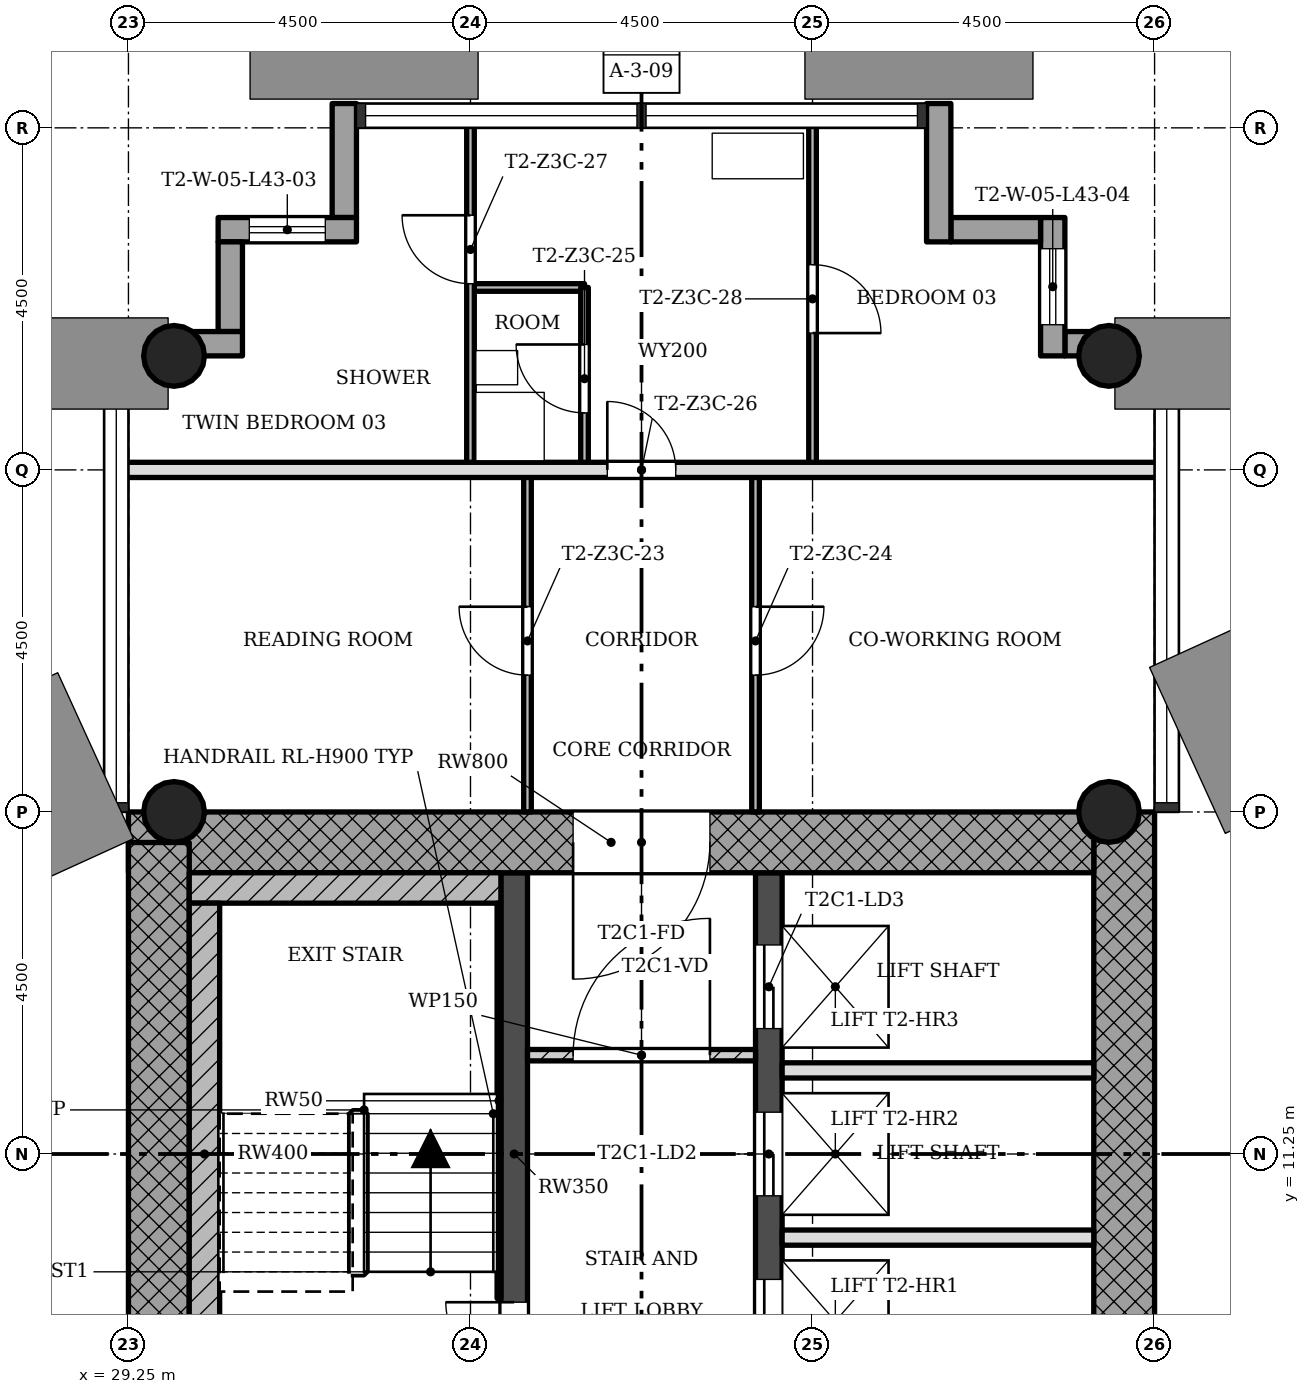
"""IFC4 building model, lengths in metres.
Left out: names, types, materials, properties, quantities, classifications, styles, units other than length and angle.
Written with IfcOpenShell. Run it as: python <this file> out.ifc"""

import sys

from ifc_helpers import new_model, si_unit, direction, frame, frame_2d, origin, origin_2d, place, context, subcontext, project, spatial, rectangle, hollow_circle, extrude, element, fill, save


model = new_model("IFC4")
c1 = context("Model", 3, precision=1e-05, world=origin(), true_north=direction((0.0, 1.0)))
c2 = subcontext(c1, "Body", "Model", "MODEL_VIEW")
j1 = project(units=[si_unit("LENGTHUNIT", "METRE"), si_unit("PLANEANGLEUNIT", "RADIAN")], contexts=[c1])
p1 = place(None, origin())
s1 = spatial("IfcSite", under=j1, at=p1, CompositionType="ELEMENT")
p2 = place(p1, origin())
s2 = spatial("IfcBuilding", under=s1, at=p2, CompositionType="ELEMENT")
p3 = place(p2, frame((0.0, 0.0, 157.5)))
s3 = spatial("IfcBuildingStorey", under=s2, at=p3, CompositionType="ELEMENT", Elevation=157.5)
p4 = place(p3, frame((42.35, 7.55, 0.0), z_axis=(0.0, 0.0, 1.0), x_axis=(0.0, 1.0, 0.0)))
e1 = element("IfcWall", 1, at=p4, inside=s3, PredefinedType="SHEAR", context=c2, shape_type="SweptSolid", body=[
    extrude(rectangle(XDim=8.2, YDim=0.8, at=frame_2d((4.1, 0.0))), origin(), (0.0, 0.0, 1.0), 3.4),
])
p5 = place(p3, frame((41.95, 15.35, 0.0), z_axis=(0.0, 0.0, 1.0), x_axis=(-1.0, 0.0, 0.0)))
e2 = element("IfcWall", 2, at=p5, inside=s3, PredefinedType="SHEAR", context=c2, shape_type="SweptSolid", body=[
    extrude(rectangle(XDim=12.7, YDim=0.8, at=frame_2d((6.35, 0.0))), origin(), (0.0, 0.0, 1.0), 3.4),
])
p6 = place(p5, frame((5.05, 0.0, 0.0)))
e3 = element("IfcOpeningElement", 3, at=p6, cuts=e2, PredefinedType="OPENING", context=c2, shape_type="SweptSolid", body=[
    extrude(rectangle(XDim=1.8, YDim=2.1, at=frame_2d((0.9, 1.05))), frame((0.0, 0.41, 0.0), z_axis=(0.0, -1.0, 0.0), x_axis=(1.0, 0.0, 0.0)), (0.0, 0.0, 1.0), 0.82),
])
p7 = place(p3, frame((29.65, 15.348, 0.0), z_axis=(0.0, 0.0, 1.0), x_axis=(0.0, -1.0, 0.0)))
e4 = element("IfcWall", 4, at=p7, inside=s3, PredefinedType="SHEAR", context=c2, shape_type="SweptSolid", body=[
    extrude(rectangle(XDim=8.796, YDim=0.8, at=frame_2d((4.398, 0.0))), origin(), (0.0, 0.0, 1.0), 3.4),
])
p8 = place(p3, frame((34.325, 7.55, 0.0), z_axis=(0.0, 0.0, 1.0), x_axis=(0.0, 1.0, 0.0)))
e5 = element("IfcWall", 5, at=p8, inside=s3, PredefinedType="SHEAR", context=c2, shape_type="SweptSolid", body=[
    extrude(rectangle(XDim=7.4, YDim=0.35, at=frame_2d((3.7, 0.0))), origin(), (0.0, 0.0, 1.0), 3.4),
])
p9 = place(p8, frame((0.85, 0.0, 0.0)))
e6 = element("IfcOpeningElement", 6, at=p9, cuts=e5, PredefinedType="OPENING", context=c2, shape_type="SweptSolid", body=[
    extrude(rectangle(XDim=0.9, YDim=2.1, at=frame_2d((0.45, 1.05))), frame((0.0, 0.185, 0.0), z_axis=(0.0, -1.0, 0.0), x_axis=(1.0, 0.0, 0.0)), (0.0, 0.0, 1.0), 0.37),
])
p10 = place(p3, frame((37.675, 7.55, 0.0), z_axis=(0.0, 0.0, 1.0), x_axis=(0.0, 1.0, 0.0)))
e7 = element("IfcWall", 7, at=p10, inside=s3, PredefinedType="SHEAR", context=c2, shape_type="SweptSolid", body=[
    extrude(rectangle(XDim=7.4, YDim=0.35, at=frame_2d((3.7, 0.0))), origin(), (0.0, 0.0, 1.0), 3.4),
])
p11 = place(p10, frame((0.95, 0.0, 0.0)))
e8 = element("IfcOpeningElement", 8, at=p11, cuts=e7, PredefinedType="OPENING", context=c2, shape_type="SweptSolid", body=[
    extrude(rectangle(XDim=1.1, YDim=2.1, at=frame_2d((0.55, 1.05))), frame((0.0, 0.185, 0.0), z_axis=(0.0, -1.0, 0.0), x_axis=(1.0, 0.0, 0.0)), (0.0, 0.0, 1.0), 0.37),
])
p12 = place(p10, frame((3.15, 0.0, 0.0)))
e9 = element("IfcOpeningElement", 9, at=p12, cuts=e7, PredefinedType="OPENING", context=c2, shape_type="SweptSolid", body=[
    extrude(rectangle(XDim=1.1, YDim=2.1, at=frame_2d((0.55, 1.05))), frame((0.0, 0.185, 0.0), z_axis=(0.0, -1.0, 0.0), x_axis=(1.0, 0.0, 0.0)), (0.0, 0.0, 1.0), 0.37),
])
p13 = place(p10, frame((5.35, 0.0, 0.0)))
e10 = element("IfcOpeningElement", 10, at=p13, cuts=e7, PredefinedType="OPENING", context=c2, shape_type="SweptSolid", body=[
    extrude(rectangle(XDim=1.1, YDim=2.1, at=frame_2d((0.55, 1.05))), frame((0.0, 0.185, 0.0), z_axis=(0.0, -1.0, 0.0), x_axis=(1.0, 0.0, 0.0)), (0.0, 0.0, 1.0), 0.37),
])
for number, where, z_axis, x_axis in (
    (11, (42.15, 15.75, 0.0), (0.0, 0.0, 1.0), (1.0, 0.0, 0.0)),
    (12, (29.85, 15.75, 0.0), (0.0, 0.0, 1.0), (1.0, 0.0, 0.0)),
    (13, (42.15, 21.75, 0.0), (0.0, 0.0, 1.0), (1.0, 0.0, 0.0)),
    (14, (29.85, 21.75, 0.0), (0.0, 0.0, 1.0), (1.0, 0.0, 0.0)),
):
    element("IfcColumn", number, at=place(p3, frame(where, z_axis=z_axis, x_axis=x_axis)), inside=s3, PredefinedType="COLUMN", context=c2, shape_type="SweptSolid", body=[
        extrude(hollow_circle(Radius=0.4, WallThickness=0.028, at=origin_2d()), origin(), (0.0, 0.0, 1.0), 3.4),
    ])
p14 = place(p3, frame((43.07, 21.91, -0.3), z_axis=(0.0, 0.0, 1.0), x_axis=(-1.0, 0.0, 0.0)))
e15 = element("IfcWall", 15, at=p14, inside=s3, PredefinedType="STANDARD", context=c2, shape_type="SweptSolid", body=[
    extrude(rectangle(XDim=1.5, YDim=0.32, at=frame_2d((0.75, 0.0))), origin(), (0.0, 0.0, 1.0), 3.4),
])
p15 = place(p3, frame((41.41, 21.75, -0.3), z_axis=(0.0, 0.0, 1.0), x_axis=(0.0, 1.0, 0.0)))
e16 = element("IfcWall", 16, at=p15, inside=s3, PredefinedType="STANDARD", context=c2, shape_type="SweptSolid", body=[
    extrude(rectangle(XDim=1.82, YDim=0.32, at=frame_2d((0.91, 0.0))), origin(), (0.0, 0.0, 1.0), 3.4),
])
p16 = place(p15, frame((0.41, 0.0, 1.2)))
e17 = element("IfcOpeningElement", 17, at=p16, cuts=e16, PredefinedType="OPENING", context=c2, shape_type="SweptSolid", body=[
    extrude(rectangle(XDim=1.0, YDim=1.5, at=frame_2d((0.5, 0.75))), frame((0.0, 0.17, 0.0), z_axis=(0.0, -1.0, 0.0), x_axis=(1.0, 0.0, 0.0)), (0.0, 0.0, 1.0), 0.34),
])
p17 = place(p3, frame((41.25, 23.41, -0.3), z_axis=(0.0, 0.0, 1.0), x_axis=(-1.0, 0.0, 0.0)))
e18 = element("IfcWall", 18, at=p17, inside=s3, PredefinedType="STANDARD", context=c2, shape_type="SweptSolid", body=[
    extrude(rectangle(XDim=1.18, YDim=0.32, at=frame_2d((0.59, 0.0))), origin(), (0.0, 0.0, 1.0), 3.4),
])
p18 = place(p3, frame((39.91, 23.25, -0.3), z_axis=(0.0, 0.0, 1.0), x_axis=(0.0, 1.0, 0.0)))
e19 = element("IfcWall", 19, at=p18, inside=s3, PredefinedType="STANDARD", context=c2, shape_type="SweptSolid", body=[
    extrude(rectangle(XDim=1.82, YDim=0.32, at=frame_2d((0.91, 0.0))), origin(), (0.0, 0.0, 1.0), 3.4),
])
p19 = place(p3, frame((32.09, 25.07, -0.3), z_axis=(0.0, 0.0, 1.0), x_axis=(0.0, -1.0, 0.0)))
e20 = element("IfcWall", 20, at=p19, inside=s3, PredefinedType="STANDARD", context=c2, shape_type="SweptSolid", body=[
    extrude(rectangle(XDim=1.5, YDim=0.32, at=frame_2d((0.75, 0.0))), origin(), (0.0, 0.0, 1.0), 3.4),
])
p20 = place(p3, frame((32.25, 23.41, -0.3), z_axis=(0.0, 0.0, 1.0), x_axis=(-1.0, 0.0, 0.0)))
e21 = element("IfcWall", 21, at=p20, inside=s3, PredefinedType="STANDARD", context=c2, shape_type="SweptSolid", body=[
    extrude(rectangle(XDim=1.82, YDim=0.32, at=frame_2d((0.91, 0.0))), origin(), (0.0, 0.0, 1.0), 3.4),
])
p21 = place(p20, frame((0.41, 0.0, 1.2)))
e22 = element("IfcOpeningElement", 22, at=p21, cuts=e21, PredefinedType="OPENING", context=c2, shape_type="SweptSolid", body=[
    extrude(rectangle(XDim=1.0, YDim=1.5, at=frame_2d((0.5, 0.75))), frame((0.0, 0.17, 0.0), z_axis=(0.0, -1.0, 0.0), x_axis=(1.0, 0.0, 0.0)), (0.0, 0.0, 1.0), 0.34),
])
p22 = place(p3, frame((30.59, 23.25, -0.3), z_axis=(0.0, 0.0, 1.0), x_axis=(0.0, -1.0, 0.0)))
e23 = element("IfcWall", 23, at=p22, inside=s3, PredefinedType="STANDARD", context=c2, shape_type="SweptSolid", body=[
    extrude(rectangle(XDim=1.18, YDim=0.32, at=frame_2d((0.59, 0.0))), origin(), (0.0, 0.0, 1.0), 3.4),
])
p23 = place(p3, frame((30.75, 21.91, -0.3), z_axis=(0.0, 0.0, 1.0), x_axis=(-1.0, 0.0, 0.0)))
e24 = element("IfcWall", 24, at=p23, inside=s3, PredefinedType="STANDARD", context=c2, shape_type="SweptSolid", body=[
    extrude(rectangle(XDim=1.82, YDim=0.32, at=frame_2d((0.91, 0.0))), origin(), (0.0, 0.0, 1.0), 3.4),
])
p24 = place(p3, frame((37.5, 12.55, 0.0), z_axis=(0.0, 0.0, 1.0), x_axis=(-1.0, 0.0, 0.0)))
e25 = element("IfcWall", 25, at=p24, inside=s3, PredefinedType="PARTITIONING", context=c2, shape_type="SweptSolid", body=[
    extrude(rectangle(XDim=3.0, YDim=0.15, at=frame_2d((1.5, 0.0))), origin(), (0.0, 0.0, 1.0), 3.0),
])
p25 = place(p24, frame((0.6, 0.0, 0.0)))
e26 = element("IfcOpeningElement", 26, at=p25, cuts=e25, PredefinedType="OPENING", context=c2, shape_type="SweptSolid", body=[
    extrude(rectangle(XDim=1.8, YDim=2.1, at=frame_2d((0.9, 1.05))), frame((0.0, 0.085, 0.0), z_axis=(0.0, -1.0, 0.0), x_axis=(1.0, 0.0, 0.0)), (0.0, 0.0, 1.0), 0.17),
])
for number, where, z_axis, x_axis in (
    (27, (41.95, 10.15, 0.0), (0.0, 0.0, 1.0), (-1.0, 0.0, 0.0)),
    (28, (41.95, 12.35, 0.0), (0.0, 0.0, 1.0), (-1.0, 0.0, 0.0)),
):
    element("IfcWall", number, at=place(p3, frame(where, z_axis=z_axis, x_axis=x_axis)), inside=s3, PredefinedType="SOLIDWALL", context=c2, shape_type="SweptSolid", body=[
        extrude(rectangle(XDim=4.1, YDim=0.2, at=frame_2d((2.05, 0.0))), origin(), (0.0, 0.0, 1.0), 3.0),
    ])
p26 = place(p3, frame((42.85, 20.25, 0.0), z_axis=(0.0, 0.0, 1.0), x_axis=(-1.0, 0.0, 0.0)))
e29 = element("IfcWall", 29, at=p26, inside=s3, PredefinedType="SOLIDWALL", context=c2, shape_type="SweptSolid", body=[
    extrude(rectangle(XDim=13.7, YDim=0.2, at=frame_2d((6.85, 0.0))), origin(), (0.0, 0.0, 1.0), 3.0),
])
p27 = place(p26, frame((6.4, 0.0, 0.0)))
e30 = element("IfcOpeningElement", 30, at=p27, cuts=e29, PredefinedType="OPENING", context=c2, shape_type="SweptSolid", body=[
    extrude(rectangle(XDim=0.9, YDim=2.1, at=frame_2d((0.45, 1.05))), frame((0.0, 0.11, 0.0), z_axis=(0.0, -1.0, 0.0), x_axis=(1.0, 0.0, 0.0)), (0.0, 0.0, 1.0), 0.22),
])
p28 = place(p3, frame((35.25, 22.65, 0.0), z_axis=(0.0, 0.0, 1.0), x_axis=(-1.0, 0.0, 0.0)))
e31 = element("IfcWall", 31, at=p28, inside=s3, PredefinedType="PARTITIONING", context=c2, shape_type="SweptSolid", body=[
    extrude(rectangle(XDim=1.5, YDim=0.1, at=frame_2d((0.75, 0.0))), origin(), (0.0, 0.0, 1.0), 3.0),
])
p29 = place(p3, frame((38.25, 20.25, 0.0), z_axis=(0.0, 0.0, 1.0), x_axis=(0.0, 1.0, 0.0)))
e32 = element("IfcWall", 32, at=p29, inside=s3, PredefinedType="PARTITIONING", context=c2, shape_type="SweptSolid", body=[
    extrude(rectangle(XDim=4.6, YDim=0.1, at=frame_2d((2.3, 0.0))), origin(), (0.0, 0.0, 1.0), 3.0),
])
p30 = place(p29, frame((1.8, 0.0, 0.0)))
e33 = element("IfcOpeningElement", 33, at=p30, cuts=e32, PredefinedType="OPENING", context=c2, shape_type="SweptSolid", body=[
    extrude(rectangle(XDim=0.9, YDim=2.1, at=frame_2d((0.45, 1.05))), frame((0.0, 0.06, 0.0), z_axis=(0.0, -1.0, 0.0), x_axis=(1.0, 0.0, 0.0)), (0.0, 0.0, 1.0), 0.12),
])
p31 = place(p3, frame((37.5, 15.75, 0.0), z_axis=(0.0, 0.0, 1.0), x_axis=(0.0, 1.0, 0.0)))
e34 = element("IfcWall", 34, at=p31, inside=s3, PredefinedType="PARTITIONING", context=c2, shape_type="SweptSolid", body=[
    extrude(rectangle(XDim=4.5, YDim=0.1, at=frame_2d((2.25, 0.0))), origin(), (0.0, 0.0, 1.0), 3.0),
])
p32 = place(p31, frame((1.8, 0.0, 0.0)))
e35 = element("IfcOpeningElement", 35, at=p32, cuts=e34, PredefinedType="OPENING", context=c2, shape_type="SweptSolid", body=[
    extrude(rectangle(XDim=0.9, YDim=2.1, at=frame_2d((0.45, 1.05))), frame((0.0, 0.06, 0.0), z_axis=(0.0, -1.0, 0.0), x_axis=(1.0, 0.0, 0.0)), (0.0, 0.0, 1.0), 0.12),
])
p33 = place(p3, frame((35.25, 20.25, 0.0), z_axis=(0.0, 0.0, 1.0), x_axis=(0.0, 1.0, 0.0)))
e36 = element("IfcWall", 36, at=p33, inside=s3, PredefinedType="PARTITIONING", context=c2, shape_type="SweptSolid", body=[
    extrude(rectangle(XDim=2.4, YDim=0.1, at=frame_2d((1.2, 0.0))), origin(), (0.0, 0.0, 1.0), 3.0),
])
p34 = place(p33, frame((0.75, 0.0, 0.0)))
e37 = element("IfcOpeningElement", 37, at=p34, cuts=e36, PredefinedType="OPENING", context=c2, shape_type="SweptSolid", body=[
    extrude(rectangle(XDim=0.9, YDim=2.1, at=frame_2d((0.45, 1.05))), frame((0.0, 0.06, 0.0), z_axis=(0.0, -1.0, 0.0), x_axis=(1.0, 0.0, 0.0)), (0.0, 0.0, 1.0), 0.12),
])
p35 = place(p3, frame((34.5, 15.75, 0.0), z_axis=(0.0, 0.0, 1.0), x_axis=(0.0, 1.0, 0.0)))
e38 = element("IfcWall", 38, at=p35, inside=s3, PredefinedType="PARTITIONING", context=c2, shape_type="SweptSolid", body=[
    extrude(rectangle(XDim=4.5, YDim=0.1, at=frame_2d((2.25, 0.0))), origin(), (0.0, 0.0, 1.0), 3.0),
])
p36 = place(p35, frame((1.8, 0.0, 0.0)))
e39 = element("IfcOpeningElement", 39, at=p36, cuts=e38, PredefinedType="OPENING", context=c2, shape_type="SweptSolid", body=[
    extrude(rectangle(XDim=0.9, YDim=2.1, at=frame_2d((0.45, 1.05))), frame((0.0, 0.06, 0.0), z_axis=(0.0, -1.0, 0.0), x_axis=(1.0, 0.0, 0.0)), (0.0, 0.0, 1.0), 0.12),
])
p37 = place(p3, frame((33.75, 20.25, 0.0), z_axis=(0.0, 0.0, 1.0), x_axis=(0.0, 1.0, 0.0)))
e40 = element("IfcWall", 40, at=p37, inside=s3, PredefinedType="PARTITIONING", context=c2, shape_type="SweptSolid", body=[
    extrude(rectangle(XDim=4.6, YDim=0.1, at=frame_2d((2.3, 0.0))), origin(), (0.0, 0.0, 1.0), 3.0),
])
p38 = place(p37, frame((2.45, 0.0, 0.0)))
e41 = element("IfcOpeningElement", 41, at=p38, cuts=e40, PredefinedType="OPENING", context=c2, shape_type="SweptSolid", body=[
    extrude(rectangle(XDim=0.9, YDim=2.1, at=frame_2d((0.45, 1.05))), frame((0.0, 0.06, 0.0), z_axis=(0.0, -1.0, 0.0), x_axis=(1.0, 0.0, 0.0)), (0.0, 0.0, 1.0), 0.12),
])
p39 = place(p3, frame((34.15, 14.75, 0.0), z_axis=(0.0, 0.0, 1.0), x_axis=(-1.0, 0.0, 0.0)))
e42 = element("IfcWall", 42, at=p39, inside=s3, PredefinedType="SHEAR", context=c2, shape_type="SweptSolid", body=[
    extrude(rectangle(XDim=4.1, YDim=0.4, at=frame_2d((2.05, 0.0))), origin(), (0.0, 0.0, 1.0), 3.4),
])
p40 = place(p3, frame((30.25, 7.95, 0.0), z_axis=(0.0, 0.0, 1.0), x_axis=(0.0, 1.0, 0.0)))
e43 = element("IfcWall", 43, at=p40, inside=s3, PredefinedType="SHEAR", context=c2, shape_type="SweptSolid", body=[
    extrude(rectangle(XDim=6.6, YDim=0.4, at=frame_2d((3.3, 0.0))), origin(), (0.0, 0.0, 1.0), 3.4),
])
p41 = place(p3, frame((34.125, 9.35, 0.0), z_axis=(0.0, 0.0, 1.0), x_axis=(0.0, 1.0, 0.0)))
e44 = element("IfcWall", 44, at=p41, inside=s3, PredefinedType="SHEAR", context=c2, shape_type="SweptSolid", body=[
    extrude(rectangle(XDim=5.2, YDim=0.05, at=frame_2d((2.6, 0.0))), origin(), (0.0, 0.0, 1.0), 3.4),
])
p42 = place(p25, origin())
e45 = element("IfcDoor", 45, at=p42, inside=s3, OperationType="SINGLE_SWING_LEFT", PredefinedType="DOOR", context=c2, shape_type="SweptSolid", body=[
    extrude(rectangle(XDim=1.8, YDim=2.1, at=frame_2d((0.9, 1.05))), frame((0.0, 0.025, 0.0), z_axis=(0.0, -1.0, 0.0), x_axis=(1.0, 0.0, 0.0)), (0.0, 0.0, 1.0), 0.05),
])
fill(e26, e45)
p43 = place(p36, origin())
e46 = element("IfcDoor", 46, at=p43, inside=s3, OperationType="SINGLE_SWING_LEFT", PredefinedType="DOOR", context=c2, shape_type="SweptSolid", body=[
    extrude(rectangle(XDim=0.9, YDim=2.1, at=frame_2d((0.45, 1.05))), frame((0.0, 0.025, 0.0), z_axis=(0.0, -1.0, 0.0), x_axis=(1.0, 0.0, 0.0)), (0.0, 0.0, 1.0), 0.05),
])
fill(e39, e46)
p44 = place(p32, origin())
e47 = element("IfcDoor", 47, at=p44, inside=s3, OperationType="SINGLE_SWING_RIGHT", PredefinedType="DOOR", context=c2, shape_type="SweptSolid", body=[
    extrude(rectangle(XDim=0.9, YDim=2.1, at=frame_2d((0.45, 1.05))), frame((0.0, 0.025, 0.0), z_axis=(0.0, -1.0, 0.0), x_axis=(1.0, 0.0, 0.0)), (0.0, 0.0, 1.0), 0.05),
])
fill(e35, e47)
p45 = place(p34, origin())
e48 = element("IfcDoor", 48, at=p45, inside=s3, OperationType="SINGLE_SWING_LEFT", PredefinedType="DOOR", context=c2, shape_type="SweptSolid", body=[
    extrude(rectangle(XDim=0.9, YDim=2.1, at=frame_2d((0.45, 1.05))), frame((0.0, 0.025, 0.0), z_axis=(0.0, -1.0, 0.0), x_axis=(1.0, 0.0, 0.0)), (0.0, 0.0, 1.0), 0.05),
])
fill(e37, e48)
p46 = place(p27, origin())
e49 = element("IfcDoor", 49, at=p46, inside=s3, OperationType="SINGLE_SWING_RIGHT", PredefinedType="DOOR", context=c2, shape_type="SweptSolid", body=[
    extrude(rectangle(XDim=0.9, YDim=2.1, at=frame_2d((0.45, 1.05))), frame((0.0, 0.025, 0.0), z_axis=(0.0, -1.0, 0.0), x_axis=(1.0, 0.0, 0.0)), (0.0, 0.0, 1.0), 0.05),
])
fill(e30, e49)
p47 = place(p38, origin())
e50 = element("IfcDoor", 50, at=p47, inside=s3, OperationType="SINGLE_SWING_LEFT", PredefinedType="DOOR", context=c2, shape_type="SweptSolid", body=[
    extrude(rectangle(XDim=0.9, YDim=2.1, at=frame_2d((0.45, 1.05))), frame((0.0, 0.025, 0.0), z_axis=(0.0, -1.0, 0.0), x_axis=(1.0, 0.0, 0.0)), (0.0, 0.0, 1.0), 0.05),
])
fill(e41, e50)
p48 = place(p30, origin())
e51 = element("IfcDoor", 51, at=p48, inside=s3, OperationType="SINGLE_SWING_LEFT", PredefinedType="DOOR", context=c2, shape_type="SweptSolid", body=[
    extrude(rectangle(XDim=0.9, YDim=2.1, at=frame_2d((0.45, 1.05))), frame((0.0, 0.025, 0.0), z_axis=(0.0, -1.0, 0.0), x_axis=(1.0, 0.0, 0.0)), (0.0, 0.0, 1.0), 0.05),
])
fill(e33, e51)
p49 = place(p9, origin())
e52 = element("IfcDoor", 52, at=p49, inside=s3, OperationType="SINGLE_SWING_LEFT", PredefinedType="DOOR", context=c2, shape_type="SweptSolid", body=[
    extrude(rectangle(XDim=0.9, YDim=2.1, at=frame_2d((0.45, 1.05))), frame((0.0, 0.025, 0.0), z_axis=(0.0, -1.0, 0.0), x_axis=(1.0, 0.0, 0.0)), (0.0, 0.0, 1.0), 0.05),
])
fill(e6, e52)
p50 = place(p11, origin())
e53 = element("IfcDoor", 53, at=p50, inside=s3, OperationType="SLIDING_TO_LEFT", PredefinedType="DOOR", context=c2, shape_type="SweptSolid", body=[
    extrude(rectangle(XDim=1.1, YDim=2.1, at=frame_2d((0.55, 1.05))), frame((0.0, 0.025, 0.0), z_axis=(0.0, -1.0, 0.0), x_axis=(1.0, 0.0, 0.0)), (0.0, 0.0, 1.0), 0.05),
])
fill(e8, e53)
p51 = place(p12, origin())
e54 = element("IfcDoor", 54, at=p51, inside=s3, OperationType="SLIDING_TO_LEFT", PredefinedType="DOOR", context=c2, shape_type="SweptSolid", body=[
    extrude(rectangle(XDim=1.1, YDim=2.1, at=frame_2d((0.55, 1.05))), frame((0.0, 0.025, 0.0), z_axis=(0.0, -1.0, 0.0), x_axis=(1.0, 0.0, 0.0)), (0.0, 0.0, 1.0), 0.05),
])
fill(e9, e54)
p52 = place(p13, origin())
e55 = element("IfcDoor", 55, at=p52, inside=s3, OperationType="SLIDING_TO_LEFT", PredefinedType="DOOR", context=c2, shape_type="SweptSolid", body=[
    extrude(rectangle(XDim=1.1, YDim=2.1, at=frame_2d((0.55, 1.05))), frame((0.0, 0.025, 0.0), z_axis=(0.0, -1.0, 0.0), x_axis=(1.0, 0.0, 0.0)), (0.0, 0.0, 1.0), 0.05),
])
fill(e10, e55)
p53 = place(p6, origin())
e56 = element("IfcDoor", 56, at=p53, inside=s3, OperationType="SINGLE_SWING_LEFT", PredefinedType="DOOR", context=c2, shape_type="SweptSolid", body=[
    extrude(rectangle(XDim=1.8, YDim=2.1, at=frame_2d((0.9, 1.05))), frame((0.0, 0.025, 0.0), z_axis=(0.0, -1.0, 0.0), x_axis=(1.0, 0.0, 0.0)), (0.0, 0.0, 1.0), 0.05),
])
fill(e3, e56)
p54 = place(p21, origin())
e57 = element("IfcWindow", 57, at=p54, inside=s3, PartitioningType="SINGLE_PANEL", PredefinedType="WINDOW", context=c2, shape_type="SweptSolid", body=[
    extrude(rectangle(XDim=1.0, YDim=1.5, at=frame_2d((0.5, 0.75))), frame((0.0, 0.03, 0.0), z_axis=(0.0, -1.0, 0.0), x_axis=(1.0, 0.0, 0.0)), (0.0, 0.0, 1.0), 0.06),
])
fill(e22, e57)
p55 = place(p16, origin())
e58 = element("IfcWindow", 58, at=p55, inside=s3, PartitioningType="SINGLE_PANEL", PredefinedType="WINDOW", context=c2, shape_type="SweptSolid", body=[
    extrude(rectangle(XDim=1.0, YDim=1.5, at=frame_2d((0.5, 0.75))), frame((0.0, 0.03, 0.0), z_axis=(0.0, -1.0, 0.0), x_axis=(1.0, 0.0, 0.0)), (0.0, 0.0, 1.0), 0.06),
])
fill(e17, e58)
save(model, sys.argv[1])
